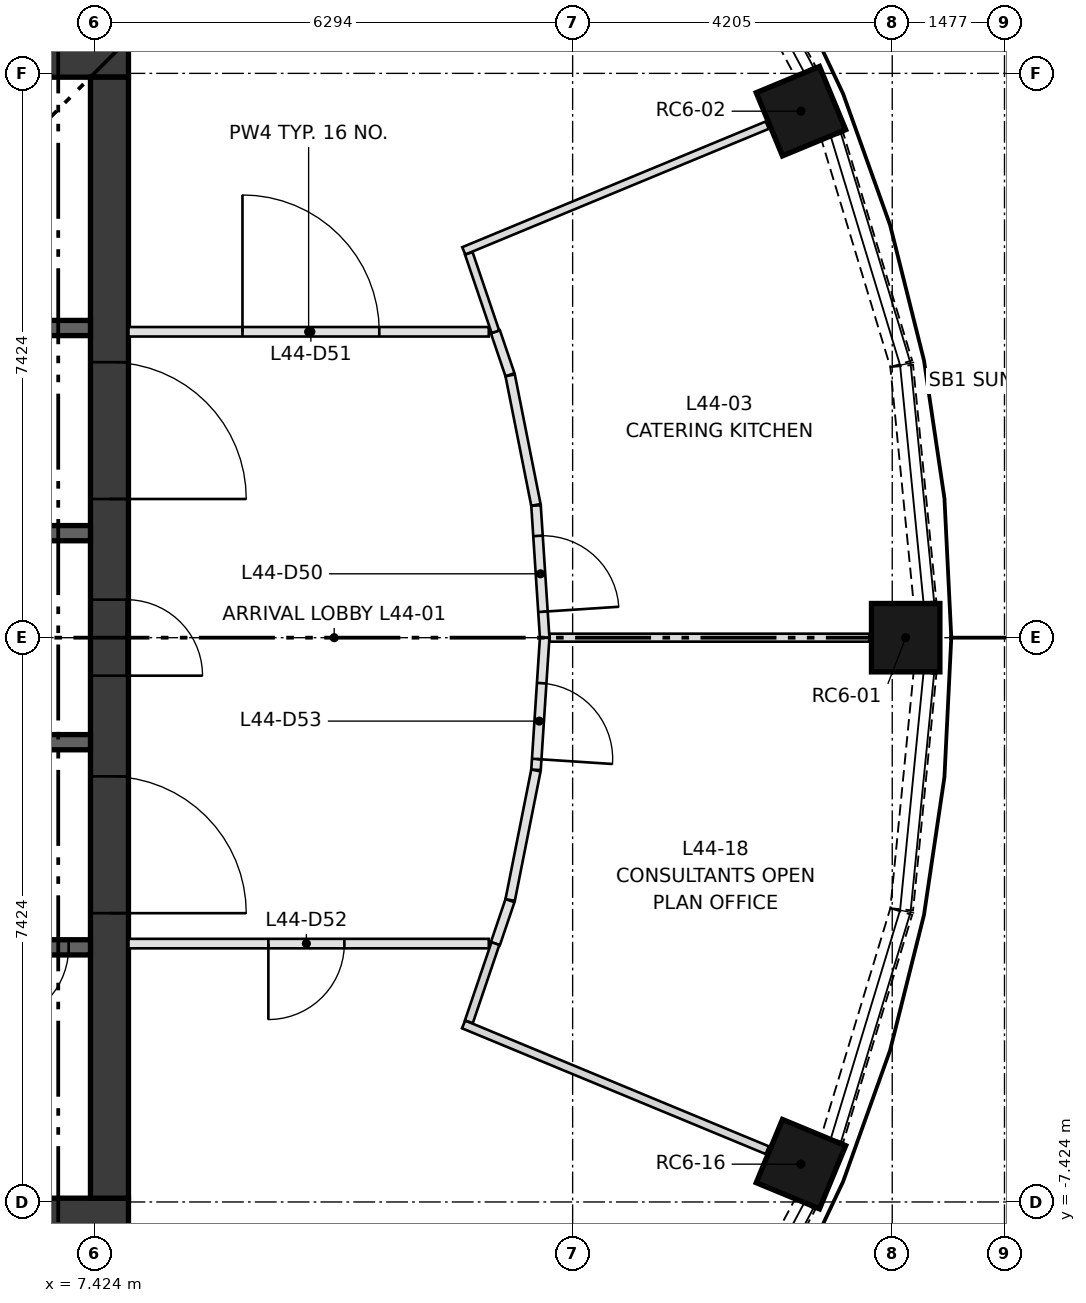
"""IFC4 building model, lengths in metres.
Left out: names, types, materials, properties, quantities, classifications, styles, units other than length and angle.
Written with IfcOpenShell. Run it as: python <this file> out.ifc"""

import sys

from ifc_helpers import new_model, si_unit, direction, frame, frame_2d, origin, origin_2d, place, context, subcontext, project, spatial, rectangle, extrude, element, fill, save


model = new_model("IFC4")
c1 = context("Model", 3, precision=1e-05, world=origin(), true_north=direction((0.0, 1.0)))
c2 = subcontext(c1, "Body", "Model", "MODEL_VIEW")
j1 = project(units=[si_unit("LENGTHUNIT", "METRE"), si_unit("PLANEANGLEUNIT", "RADIAN")], contexts=[c1])
p1 = place(None, origin())
s1 = spatial("IfcSite", under=j1, at=p1, CompositionType="ELEMENT")
p2 = place(p1, origin())
s2 = spatial("IfcBuilding", under=s1, at=p2, CompositionType="ELEMENT")
p3 = place(p2, frame((0.0, 0.0, 167.55)))
s3 = spatial("IfcBuildingStorey", under=s2, at=p3, CompositionType="ELEMENT", Elevation=167.55)
for number, where, z_axis, x_axis in (
    (1, (18.1, 0.0, 0.0), (0.0, 0.0, 1.0), (1.0, 0.0, 0.0)),
    (2, (16.722, 6.927, 0.0), (0.0, 0.0, 1.0), (0.924, 0.383, 0.0)),
    (3, (16.722, -6.927, 0.0), (0.0, 0.0, 1.0), (0.924, -0.383, 0.0)),
):
    element("IfcColumn", number, at=place(p3, frame(where, z_axis=z_axis, x_axis=x_axis)), inside=s3, PredefinedType="COLUMN", context=c2, shape_type="SweptSolid", body=[
        extrude(rectangle(XDim=0.9, YDim=0.9, at=origin_2d()), origin(), (0.0, 0.0, 1.0), 3.35),
    ])
for number, where, z_axis, x_axis in (
    (4, (-7.874, -7.624, 0.0), (0.0, 0.0, 1.0), (1.0, 0.0, 0.0)),
    (5, (-7.874, 7.624, 0.0), (0.0, 0.0, 1.0), (1.0, 0.0, 0.0)),
):
    element("IfcWall", number, at=place(p3, frame(where, z_axis=z_axis, x_axis=x_axis)), inside=s3, PredefinedType="SHEAR", context=c2, shape_type="SweptSolid", body=[
        extrude(rectangle(XDim=15.748, YDim=0.5, at=frame_2d((7.874, 0.0))), origin(), (0.0, 0.0, 1.0), 3.35),
    ])
p4 = place(p3, frame((7.624, -7.374, 0.0), z_axis=(0.0, 0.0, 1.0), x_axis=(0.0, 1.0, 0.0)))
e6 = element("IfcWall", 6, at=p4, inside=s3, PredefinedType="SHEAR", context=c2, shape_type="SweptSolid", body=[
    extrude(rectangle(XDim=14.748, YDim=0.5, at=frame_2d((7.374, 0.0))), origin(), (0.0, 0.0, 1.0), 3.35),
])
p5 = place(p4, frame((6.874, 0.0, 0.0)))
e7 = element("IfcOpeningElement", 7, at=p5, cuts=e6, PredefinedType="OPENING", context=c2, shape_type="SweptSolid", body=[
    extrude(rectangle(XDim=1.0, YDim=2.1, at=frame_2d((0.5, 1.05))), frame((0.0, 0.26, 0.0), z_axis=(0.0, -1.0, 0.0), x_axis=(1.0, 0.0, 0.0)), (0.0, 0.0, 1.0), 0.52),
])
p6 = place(p4, frame((3.75, 0.0, 0.0)))
e8 = element("IfcOpeningElement", 8, at=p6, cuts=e6, PredefinedType="OPENING", context=c2, shape_type="SweptSolid", body=[
    extrude(rectangle(XDim=1.8, YDim=2.1, at=frame_2d((0.9, 1.05))), frame((0.0, 0.26, 0.0), z_axis=(0.0, -1.0, 0.0), x_axis=(1.0, 0.0, 0.0)), (0.0, 0.0, 1.0), 0.52),
])
p7 = place(p4, frame((9.198, 0.0, 0.0)))
e9 = element("IfcOpeningElement", 9, at=p7, cuts=e6, PredefinedType="OPENING", context=c2, shape_type="SweptSolid", body=[
    extrude(rectangle(XDim=1.8, YDim=2.1, at=frame_2d((0.9, 1.05))), frame((0.0, 0.26, 0.0), z_axis=(0.0, -1.0, 0.0), x_axis=(1.0, 0.0, 0.0)), (0.0, 0.0, 1.0), 0.52),
])
p8 = place(p3, frame((-7.374, -4.074, 0.0), z_axis=(0.0, 0.0, 1.0), x_axis=(1.0, 0.0, 0.0)))
e10 = element("IfcWall", 10, at=p8, inside=s3, PredefinedType="SHEAR", context=c2, shape_type="SweptSolid", body=[
    extrude(rectangle(XDim=14.748, YDim=0.2, at=frame_2d((7.374, 0.0))), origin(), (0.0, 0.0, 1.0), 3.0),
])
p9 = place(p8, frame((1.319, 0.0, 0.0)))
e11 = element("IfcOpeningElement", 11, at=p9, cuts=e10, PredefinedType="OPENING", context=c2, shape_type="SweptSolid", body=[
    extrude(rectangle(XDim=1.1, YDim=2.1, at=frame_2d((0.55, 1.05))), frame((0.0, 0.11, 0.0), z_axis=(0.0, -1.0, 0.0), x_axis=(1.0, 0.0, 0.0)), (0.0, 0.0, 1.0), 0.22),
])
p10 = place(p8, frame((4.456, 0.0, 0.0)))
e12 = element("IfcOpeningElement", 12, at=p10, cuts=e10, PredefinedType="OPENING", context=c2, shape_type="SweptSolid", body=[
    extrude(rectangle(XDim=1.1, YDim=2.1, at=frame_2d((0.55, 1.05))), frame((0.0, 0.11, 0.0), z_axis=(0.0, -1.0, 0.0), x_axis=(1.0, 0.0, 0.0)), (0.0, 0.0, 1.0), 0.22),
])
p11 = place(p8, frame((7.551, 0.0, 0.0)))
e13 = element("IfcOpeningElement", 13, at=p11, cuts=e10, PredefinedType="OPENING", context=c2, shape_type="SweptSolid", body=[
    extrude(rectangle(XDim=1.0, YDim=2.1, at=frame_2d((0.5, 1.05))), frame((0.0, 0.11, 0.0), z_axis=(0.0, -1.0, 0.0), x_axis=(1.0, 0.0, 0.0)), (0.0, 0.0, 1.0), 0.22),
])
p12 = place(p8, frame((9.914, 0.0, 0.0)))
e14 = element("IfcOpeningElement", 14, at=p12, cuts=e10, PredefinedType="OPENING", context=c2, shape_type="SweptSolid", body=[
    extrude(rectangle(XDim=1.0, YDim=2.1, at=frame_2d((0.5, 1.05))), frame((0.0, 0.11, 0.0), z_axis=(0.0, -1.0, 0.0), x_axis=(1.0, 0.0, 0.0)), (0.0, 0.0, 1.0), 0.22),
])
p13 = place(p8, frame((11.688, 0.0, 0.0)))
e15 = element("IfcOpeningElement", 15, at=p13, cuts=e10, PredefinedType="OPENING", context=c2, shape_type="SweptSolid", body=[
    extrude(rectangle(XDim=1.0, YDim=2.1, at=frame_2d((0.5, 1.05))), frame((0.0, 0.11, 0.0), z_axis=(0.0, -1.0, 0.0), x_axis=(1.0, 0.0, 0.0)), (0.0, 0.0, 1.0), 0.22),
])
p14 = place(p8, frame((13.461, 0.0, 0.0)))
e16 = element("IfcOpeningElement", 16, at=p14, cuts=e10, PredefinedType="OPENING", context=c2, shape_type="SweptSolid", body=[
    extrude(rectangle(XDim=1.0, YDim=2.1, at=frame_2d((0.5, 1.05))), frame((0.0, 0.11, 0.0), z_axis=(0.0, -1.0, 0.0), x_axis=(1.0, 0.0, 0.0)), (0.0, 0.0, 1.0), 0.22),
])
p15 = place(p3, frame((0.0, 4.074, 0.0), z_axis=(0.0, 0.0, 1.0), x_axis=(1.0, 0.0, 0.0)))
e17 = element("IfcWall", 17, at=p15, inside=s3, PredefinedType="SHEAR", context=c2, shape_type="SweptSolid", body=[
    extrude(rectangle(XDim=7.374, YDim=0.2, at=frame_2d((3.687, 0.0))), origin(), (0.0, 0.0, 1.0), 3.0),
])
p16 = place(p15, frame((0.384, 0.0, 0.0)))
e18 = element("IfcOpeningElement", 18, at=p16, cuts=e17, PredefinedType="OPENING", context=c2, shape_type="SweptSolid", body=[
    extrude(rectangle(XDim=1.0, YDim=2.1, at=frame_2d((0.5, 1.05))), frame((0.0, 0.11, 0.0), z_axis=(0.0, -1.0, 0.0), x_axis=(1.0, 0.0, 0.0)), (0.0, 0.0, 1.0), 0.22),
])
p17 = place(p15, frame((2.153, 0.0, 0.0)))
e19 = element("IfcOpeningElement", 19, at=p17, cuts=e17, PredefinedType="OPENING", context=c2, shape_type="SweptSolid", body=[
    extrude(rectangle(XDim=1.0, YDim=2.1, at=frame_2d((0.5, 1.05))), frame((0.0, 0.11, 0.0), z_axis=(0.0, -1.0, 0.0), x_axis=(1.0, 0.0, 0.0)), (0.0, 0.0, 1.0), 0.22),
])
p18 = place(p15, frame((3.921, 0.0, 0.0)))
e20 = element("IfcOpeningElement", 20, at=p18, cuts=e17, PredefinedType="OPENING", context=c2, shape_type="SweptSolid", body=[
    extrude(rectangle(XDim=1.0, YDim=2.1, at=frame_2d((0.5, 1.05))), frame((0.0, 0.11, 0.0), z_axis=(0.0, -1.0, 0.0), x_axis=(1.0, 0.0, 0.0)), (0.0, 0.0, 1.0), 0.22),
])
p19 = place(p15, frame((5.79, 0.0, 0.0)))
e21 = element("IfcOpeningElement", 21, at=p19, cuts=e17, PredefinedType="OPENING", context=c2, shape_type="SweptSolid", body=[
    extrude(rectangle(XDim=0.8, YDim=2.1, at=frame_2d((0.4, 1.05))), frame((0.0, 0.11, 0.0), z_axis=(0.0, -1.0, 0.0), x_axis=(1.0, 0.0, 0.0)), (0.0, 0.0, 1.0), 0.22),
])
for number, where, z_axis, x_axis in (
    (22, (4.374, -1.375, 0.0), (0.0, 0.0, 1.0), (1.0, 0.0, 0.0)),
    (23, (4.374, 1.375, 0.0), (0.0, 0.0, 1.0), (1.0, 0.0, 0.0)),
):
    element("IfcWall", number, at=place(p3, frame(where, z_axis=z_axis, x_axis=x_axis)), inside=s3, PredefinedType="SHEAR", context=c2, shape_type="SweptSolid", body=[
        extrude(rectangle(XDim=3.0, YDim=0.2, at=frame_2d((1.5, 0.0))), origin(), (0.0, 0.0, 1.0), 3.0),
    ])
p20 = place(p3, frame((18.354, 0.464, 0.0), z_axis=(0.0, 0.0, 1.0), x_axis=(-0.098188848083, 0.995167799978, 0.0)))
e24 = element("IfcWall", 24, at=p20, inside=s3, PredefinedType="SOLIDWALL", context=c2, shape_type="SweptSolid", body=[
    extrude(rectangle(XDim=3.125, YDim=0.3, at=frame_2d((1.563, 0.0))), origin(), (0.0, 0.0, 1.0), 0.9),
])
p21 = place(p3, frame((18.042, 3.604, 0.0), z_axis=(0.0, 0.0, 1.0), x_axis=(-0.290083245834, 0.957001416136, 0.0)))
e25 = element("IfcWall", 25, at=p21, inside=s3, PredefinedType="SOLIDWALL", context=c2, shape_type="SweptSolid", body=[
    extrude(rectangle(XDim=3.127, YDim=0.3, at=frame_2d((1.563, 0.0))), origin(), (0.0, 0.0, 1.0), 0.9),
])
for number, where, z_axis, x_axis in (
    (26, (16.779, 7.452, 0.0), (0.0, 0.0, 1.0), (-0.471, 0.882, 0.0)),
    (27, (15.306, -10.209, 0.0), (0.0, 0.0, 1.0), (0.471, 0.882, 0.0)),
):
    element("IfcWall", number, at=place(p3, frame(where, z_axis=z_axis, x_axis=x_axis)), inside=s3, PredefinedType="SOLIDWALL", context=c2, shape_type="SweptSolid", body=[
        extrude(rectangle(XDim=3.125, YDim=0.3, at=frame_2d((1.562, 0.0))), origin(), (0.0, 0.0, 1.0), 0.9),
    ])
p22 = place(p3, frame((17.135, -6.596, 0.0), z_axis=(0.0, 0.0, 1.0), x_axis=(0.290083245834, 0.957001416136, 0.0)))
e28 = element("IfcWall", 28, at=p22, inside=s3, PredefinedType="SOLIDWALL", context=c2, shape_type="SweptSolid", body=[
    extrude(rectangle(XDim=3.127, YDim=0.3, at=frame_2d((1.563, 0.0))), origin(), (0.0, 0.0, 1.0), 0.9),
])
p23 = place(p3, frame((18.048, -3.574, 0.0), z_axis=(0.0, 0.0, 1.0), x_axis=(0.098188848083, 0.995167799978, 0.0)))
e29 = element("IfcWall", 29, at=p23, inside=s3, PredefinedType="SOLIDWALL", context=c2, shape_type="SweptSolid", body=[
    extrude(rectangle(XDim=3.125, YDim=0.3, at=frame_2d((1.563, 0.0))), origin(), (0.0, 0.0, 1.0), 0.9),
])
p24 = place(p3, frame((12.702, 4.024, 0.0), z_axis=(0.0, 0.0, 1.0), x_axis=(0.321374914787, -0.946952038989, 0.0)))
e30 = element("IfcWall", 30, at=p24, inside=s3, PredefinedType="PARTITIONING", context=c2, shape_type="SweptSolid", body=[
    extrude(rectangle(XDim=0.597, YDim=0.125, at=frame_2d((0.299, 0.0))), origin(), (0.0, 0.0, 1.0), 3.0),
])
p25 = place(p3, frame((12.896, 3.451, 0.0), z_axis=(0.0, 0.0, 1.0), x_axis=(0.195116516296, -0.980780069673, 0.0)))
e31 = element("IfcWall", 31, at=p25, inside=s3, PredefinedType="PARTITIONING", context=c2, shape_type="SweptSolid", body=[
    extrude(rectangle(XDim=1.738, YDim=0.125, at=frame_2d((0.869, 0.0))), origin(), (0.0, 0.0, 1.0), 3.0),
])
p26 = place(p3, frame((13.236, 1.738, 0.0), z_axis=(0.0, 0.0, 1.0), x_axis=(0.065449256286, -0.997855898841, 0.0)))
e32 = element("IfcWall", 32, at=p26, inside=s3, PredefinedType="PARTITIONING", context=c2, shape_type="SweptSolid", body=[
    extrude(rectangle(XDim=1.742, YDim=0.125, at=frame_2d((0.871, 0.0))), origin(), (0.0, 0.0, 1.0), 3.0),
])
p27 = place(p26, frame((0.4, 0.0, 0.0)))
e33 = element("IfcOpeningElement", 33, at=p27, cuts=e32, PredefinedType="OPENING", context=c2, shape_type="SweptSolid", body=[
    extrude(rectangle(XDim=1.0, YDim=2.1, at=frame_2d((0.5, 1.05))), frame((0.0, 0.073, 0.0), z_axis=(0.0, -1.0, 0.0), x_axis=(1.0, 0.0, 0.0)), (0.0, 0.0, 1.0), 0.145),
])
p28 = place(p3, frame((7.874, 4.024, 0.0), z_axis=(0.0, 0.0, 1.0), x_axis=(1.0, 0.0, 0.0)))
e34 = element("IfcWall", 34, at=p28, inside=s3, PredefinedType="PARTITIONING", context=c2, shape_type="SweptSolid", body=[
    extrude(rectangle(XDim=4.741, YDim=0.125, at=frame_2d((2.37, 0.0))), origin(), (0.0, 0.0, 1.0), 3.0),
])
p29 = place(p28, frame((1.5, 0.0, 0.0)))
e35 = element("IfcOpeningElement", 35, at=p29, cuts=e34, PredefinedType="OPENING", context=c2, shape_type="SweptSolid", body=[
    extrude(rectangle(XDim=1.8, YDim=2.1, at=frame_2d((0.9, 1.05))), frame((0.0, 0.073, 0.0), z_axis=(0.0, -1.0, 0.0), x_axis=(1.0, 0.0, 0.0)), (0.0, 0.0, 1.0), 0.145),
])
p30 = place(p3, frame((12.615, -4.024, 0.0), z_axis=(0.0, 0.0, 1.0), x_axis=(-1.0, 0.0, 0.0)))
e36 = element("IfcWall", 36, at=p30, inside=s3, PredefinedType="PARTITIONING", context=c2, shape_type="SweptSolid", body=[
    extrude(rectangle(XDim=4.741, YDim=0.125, at=frame_2d((2.37, 0.0))), origin(), (0.0, 0.0, 1.0), 3.0),
])
p31 = place(p30, frame((1.9, 0.0, 0.0)))
e37 = element("IfcOpeningElement", 37, at=p31, cuts=e36, PredefinedType="OPENING", context=c2, shape_type="SweptSolid", body=[
    extrude(rectangle(XDim=1.0, YDim=2.1, at=frame_2d((0.5, 1.05))), frame((0.0, 0.073, 0.0), z_axis=(0.0, -1.0, 0.0), x_axis=(1.0, 0.0, 0.0)), (0.0, 0.0, 1.0), 0.145),
])
p32 = place(p3, frame((12.894, -3.459, 0.0), z_axis=(0.0, 0.0, 1.0), x_axis=(-0.321374914787, -0.946952038989, 0.0)))
e38 = element("IfcWall", 38, at=p32, inside=s3, PredefinedType="PARTITIONING", context=c2, shape_type="SweptSolid", body=[
    extrude(rectangle(XDim=0.597, YDim=0.125, at=frame_2d((0.299, 0.0))), origin(), (0.0, 0.0, 1.0), 3.0),
])
p33 = place(p3, frame((13.235, -1.747, 0.0), z_axis=(0.0, 0.0, 1.0), x_axis=(-0.195116516296, -0.980780069673, 0.0)))
e39 = element("IfcWall", 39, at=p33, inside=s3, PredefinedType="PARTITIONING", context=c2, shape_type="SweptSolid", body=[
    extrude(rectangle(XDim=1.738, YDim=0.125, at=frame_2d((0.869, 0.0))), origin(), (0.0, 0.0, 1.0), 3.0),
])
p34 = place(p3, frame((13.35, 0.0, 0.0), z_axis=(0.0, 0.0, 1.0), x_axis=(-0.065449256286, -0.997855898841, 0.0)))
e40 = element("IfcWall", 40, at=p34, inside=s3, PredefinedType="PARTITIONING", context=c2, shape_type="SweptSolid", body=[
    extrude(rectangle(XDim=1.742, YDim=0.125, at=frame_2d((0.871, 0.0))), origin(), (0.0, 0.0, 1.0), 3.0),
])
p35 = place(p34, frame((0.6, 0.0, 0.0)))
e41 = element("IfcOpeningElement", 41, at=p35, cuts=e40, PredefinedType="OPENING", context=c2, shape_type="SweptSolid", body=[
    extrude(rectangle(XDim=1.0, YDim=2.1, at=frame_2d((0.5, 1.05))), frame((0.0, 0.073, 0.0), z_axis=(0.0, -1.0, 0.0), x_axis=(1.0, 0.0, 0.0)), (0.0, 0.0, 1.0), 0.145),
])
p36 = place(p3, frame((12.285, 5.089, 0.0), z_axis=(0.0, 0.0, 1.0), x_axis=(0.923865378524, 0.382717601325, 0.0)))
e42 = element("IfcWall", 42, at=p36, inside=s3, PredefinedType="PARTITIONING", context=c2, shape_type="SweptSolid", body=[
    extrude(rectangle(XDim=4.323, YDim=0.105, at=frame_2d((2.161, 0.0))), origin(), (0.0, 0.0, 1.0), 3.0),
])
p37 = place(p3, frame((12.702, 4.024, 0.0), z_axis=(0.0, 0.0, 1.0), x_axis=(-0.321468654442, 0.946920220616, 0.0)))
e43 = element("IfcWall", 43, at=p37, inside=s3, PredefinedType="PARTITIONING", context=c2, shape_type="SweptSolid", body=[
    extrude(rectangle(XDim=1.089, YDim=0.105, at=frame_2d((0.544, 0.0))), origin(), (0.0, 0.0, 1.0), 3.0),
])
p38 = place(p3, frame((17.62, 0.0, 0.0), z_axis=(0.0, 0.0, 1.0), x_axis=(-1.0, 0.0, 0.0)))
e44 = element("IfcWall", 44, at=p38, inside=s3, PredefinedType="PARTITIONING", context=c2, shape_type="SweptSolid", body=[
    extrude(rectangle(XDim=4.204, YDim=0.105, at=frame_2d((2.102, 0.0))), origin(), (0.0, 0.0, 1.0), 3.0),
])
p39 = place(p3, frame((12.283, -5.088, 0.0), z_axis=(0.0, 0.0, 1.0), x_axis=(0.923888181348, -0.382662551559, 0.0)))
e45 = element("IfcWall", 45, at=p39, inside=s3, PredefinedType="PARTITIONING", context=c2, shape_type="SweptSolid", body=[
    extrude(rectangle(XDim=4.325, YDim=0.11, at=frame_2d((2.163, 0.0))), origin(), (0.0, 0.0, 1.0), 3.0),
])
p40 = place(p3, frame((12.702, -4.024, 0.0), z_axis=(0.0, 0.0, 1.0), x_axis=(-0.321346724307, -0.946961605756, 0.0)))
e46 = element("IfcWall", 46, at=p40, inside=s3, PredefinedType="PARTITIONING", context=c2, shape_type="SweptSolid", body=[
    extrude(rectangle(XDim=1.086, YDim=0.11, at=frame_2d((0.543, 0.0))), origin(), (0.0, 0.0, 1.0), 3.0),
])
p41 = place(p14, frame((1.0, 0.0, 0.0), z_axis=(0.0, 0.0, 1.0), x_axis=(-1.0, 0.0, 0.0)))
e47 = element("IfcDoor", 47, at=p41, inside=s3, OperationType="SINGLE_SWING_LEFT", PredefinedType="DOOR", context=c2, shape_type="SweptSolid", body=[
    extrude(rectangle(XDim=1.0, YDim=2.1, at=frame_2d((0.5, 1.05))), frame((0.0, 0.025, 0.0), z_axis=(0.0, -1.0, 0.0), x_axis=(1.0, 0.0, 0.0)), (0.0, 0.0, 1.0), 0.05),
])
fill(e16, e47)
p42 = place(p5, frame((1.0, 0.0, 0.0), z_axis=(0.0, 0.0, 1.0), x_axis=(-1.0, 0.0, 0.0)))
e48 = element("IfcDoor", 48, at=p42, inside=s3, OperationType="SINGLE_SWING_LEFT", PredefinedType="DOOR", context=c2, shape_type="SweptSolid", body=[
    extrude(rectangle(XDim=1.0, YDim=2.1, at=frame_2d((0.5, 1.05))), frame((0.0, 0.25, 0.0), z_axis=(0.0, -1.0, 0.0), x_axis=(1.0, 0.0, 0.0)), (0.0, 0.0, 1.0), 0.05),
])
fill(e7, e48)
p43 = place(p6, frame((1.8, 0.0, 0.0), z_axis=(0.0, 0.0, 1.0), x_axis=(-1.0, 0.0, 0.0)))
e49 = element("IfcDoor", 49, at=p43, inside=s3, OperationType="DOUBLE_DOOR_SINGLE_SWING", PredefinedType="DOOR", context=c2, shape_type="SweptSolid", body=[
    extrude(rectangle(XDim=1.8, YDim=2.1, at=frame_2d((0.9, 1.05))), frame((0.0, 0.025, 0.0), z_axis=(0.0, -1.0, 0.0), x_axis=(1.0, 0.0, 0.0)), (0.0, 0.0, 1.0), 0.05),
])
fill(e8, e49)
p44 = place(p7, frame((1.8, 0.0, 0.0), z_axis=(0.0, 0.0, 1.0), x_axis=(-1.0, 0.0, 0.0)))
e50 = element("IfcDoor", 50, at=p44, inside=s3, OperationType="DOUBLE_DOOR_SINGLE_SWING", PredefinedType="DOOR", context=c2, shape_type="SweptSolid", body=[
    extrude(rectangle(XDim=1.8, YDim=2.1, at=frame_2d((0.9, 1.05))), frame((0.0, 0.025, 0.0), z_axis=(0.0, -1.0, 0.0), x_axis=(1.0, 0.0, 0.0)), (0.0, 0.0, 1.0), 0.05),
])
fill(e9, e50)
p45 = place(p27, origin())
e51 = element("IfcDoor", 51, at=p45, inside=s3, OperationType="SINGLE_SWING_RIGHT", PredefinedType="DOOR", context=c2, shape_type="SweptSolid", body=[
    extrude(rectangle(XDim=1.0, YDim=2.1, at=frame_2d((0.5, 1.05))), frame((0.0, 0.025, 0.0), z_axis=(0.0, -1.0, 0.0), x_axis=(1.0, 0.0, 0.0)), (0.0, 0.0, 1.0), 0.05),
])
fill(e33, e51)
p46 = place(p29, origin())
e52 = element("IfcDoor", 52, at=p46, inside=s3, OperationType="DOUBLE_DOOR_SINGLE_SWING", PredefinedType="DOOR", context=c2, shape_type="SweptSolid", body=[
    extrude(rectangle(XDim=1.8, YDim=2.1, at=frame_2d((0.9, 1.05))), frame((0.0, 0.025, 0.0), z_axis=(0.0, -1.0, 0.0), x_axis=(1.0, 0.0, 0.0)), (0.0, 0.0, 1.0), 0.05),
])
fill(e35, e52)
p47 = place(p31, origin())
e53 = element("IfcDoor", 53, at=p47, inside=s3, OperationType="SINGLE_SWING_RIGHT", PredefinedType="DOOR", context=c2, shape_type="SweptSolid", body=[
    extrude(rectangle(XDim=1.0, YDim=2.1, at=frame_2d((0.5, 1.05))), frame((0.0, 0.025, 0.0), z_axis=(0.0, -1.0, 0.0), x_axis=(1.0, 0.0, 0.0)), (0.0, 0.0, 1.0), 0.05),
])
fill(e37, e53)
p48 = place(p35, origin())
e54 = element("IfcDoor", 54, at=p48, inside=s3, OperationType="SINGLE_SWING_RIGHT", PredefinedType="DOOR", context=c2, shape_type="SweptSolid", body=[
    extrude(rectangle(XDim=1.0, YDim=2.1, at=frame_2d((0.5, 1.05))), frame((0.0, 0.025, 0.0), z_axis=(0.0, -1.0, 0.0), x_axis=(1.0, 0.0, 0.0)), (0.0, 0.0, 1.0), 0.05),
])
fill(e41, e54)
save(model, sys.argv[1])
